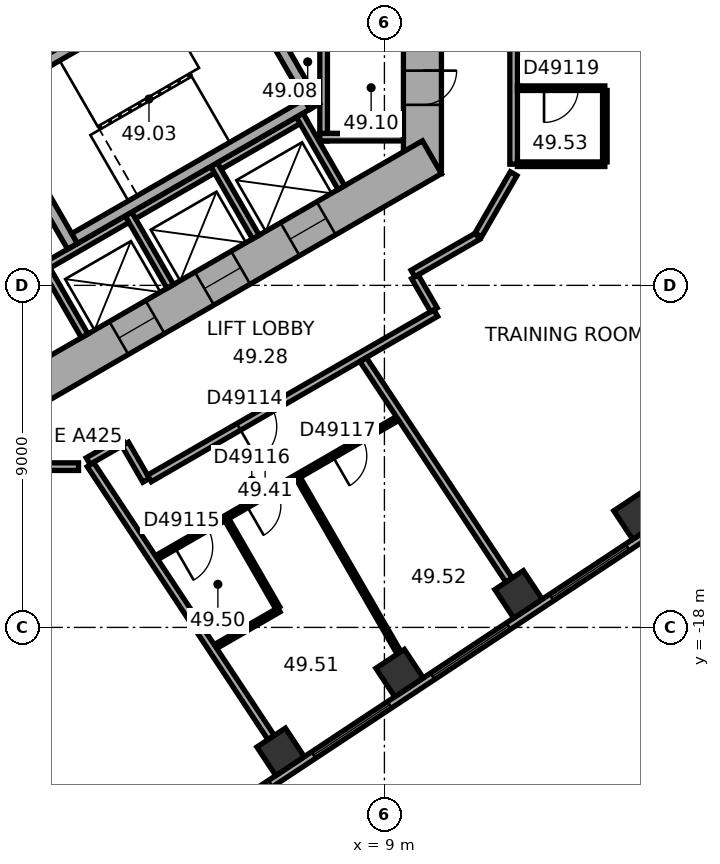
"""IFC4 building model, lengths in metres.
Left out: names, types, materials, properties, quantities, classifications, styles, units other than length and angle.
Written with IfcOpenShell. Run it as: python <this file> out.ifc"""

import sys

from ifc_helpers import new_model, si_unit, direction, frame, frame_2d, origin, origin_2d, place, context, subcontext, project, spatial, rectangle, extrude, element, fill, save


model = new_model("IFC4")
c1 = context("Model", 3, precision=1e-05, world=origin(), true_north=direction((0.0, 1.0)))
c2 = subcontext(c1, "Body", "Model", "MODEL_VIEW")
j1 = project(units=[si_unit("LENGTHUNIT", "METRE"), si_unit("PLANEANGLEUNIT", "RADIAN")], contexts=[c1])
p1 = place(None, origin())
s1 = spatial("IfcSite", under=j1, at=p1, CompositionType="ELEMENT")
p2 = place(p1, origin())
s2 = spatial("IfcBuilding", under=s1, at=p2, CompositionType="ELEMENT")
p3 = place(p2, frame((0.0, 0.0, 198.4)))
s3 = spatial("IfcBuildingStorey", under=s2, at=p3, CompositionType="ELEMENT", Elevation=198.4)
for number, where, z_axis, x_axis in (
    (1, (6.268, -21.274, 0.0), (0.0, 0.0, 1.0), (0.834, 0.552, 0.0)),
    (2, (9.398, -19.202, 0.0), (0.0, 0.0, 1.0), (0.834, 0.552, 0.0)),
    (3, (12.529, -17.13, 0.0), (0.0, 0.0, 1.0), (0.834, 0.552, 0.0)),
    (4, (15.659, -15.058, 0.0), (0.0, 0.0, 1.0), (0.834, 0.552, 0.0)),
):
    element("IfcColumn", number, at=place(p3, frame(where, z_axis=z_axis, x_axis=x_axis)), inside=s3, PredefinedType="COLUMN", context=c2, shape_type="SweptSolid", body=[
        extrude(rectangle(XDim=0.9, YDim=0.9, at=origin_2d()), origin(), (0.0, 0.0, 1.0), 3.7),
    ])
p4 = place(p3, frame((10.0, -6.062, 0.0), z_axis=(0.0, 0.0, 1.0), x_axis=(0.0, 1.0, 0.0)))
e5 = element("IfcWall", 5, at=p4, inside=s3, PredefinedType="SHEAR", context=c2, shape_type="SweptSolid", body=[
    extrude(rectangle(XDim=12.125, YDim=1.0, at=frame_2d((6.062, 0.0))), origin(), (0.0, 0.0, 1.0), 3.7),
])
p5 = place(p4, frame((6.262, 0.0, 0.0)))
e6 = element("IfcOpeningElement", 6, at=p5, cuts=e5, PredefinedType="OPENING", context=c2, shape_type="SweptSolid", body=[
    extrude(rectangle(XDim=1.5, YDim=2.1, at=frame_2d((0.75, 1.05))), frame((0.0, 0.51, 0.0), z_axis=(0.0, -1.0, 0.0), x_axis=(1.0, 0.0, 0.0)), (0.0, 0.0, 1.0), 1.02),
])
p6 = place(p4, frame((1.812, 0.0, 0.0)))
e7 = element("IfcOpeningElement", 7, at=p6, cuts=e5, PredefinedType="OPENING", context=c2, shape_type="SweptSolid", body=[
    extrude(rectangle(XDim=0.9, YDim=2.1, at=frame_2d((0.45, 1.05))), frame((0.0, 0.51, 0.0), z_axis=(0.0, -1.0, 0.0), x_axis=(1.0, 0.0, 0.0)), (0.0, 0.0, 1.0), 1.02),
])
p7 = place(p4, frame((4.412, 0.0, 0.0)))
e8 = element("IfcOpeningElement", 8, at=p7, cuts=e5, PredefinedType="OPENING", context=c2, shape_type="SweptSolid", body=[
    extrude(rectangle(XDim=0.9, YDim=2.1, at=frame_2d((0.45, 1.05))), frame((0.0, 0.51, 0.0), z_axis=(0.0, -1.0, 0.0), x_axis=(1.0, 0.0, 0.0)), (0.0, 0.0, 1.0), 1.02),
])
p8 = place(p3, frame((-10.25, -5.629, 0.0), z_axis=(0.0, 0.0, 1.0), x_axis=(0.866022616891, -0.50000482701, 0.0)))
e9 = element("IfcWall", 9, at=p8, inside=s3, PredefinedType="SHEAR", context=c2, shape_type="SweptSolid", body=[
    extrude(rectangle(XDim=12.125, YDim=1.0, at=frame_2d((6.062, 0.0))), origin(), (0.0, 0.0, 1.0), 3.7),
])
p9 = place(p8, frame((6.262, 0.0, 0.0)))
e10 = element("IfcOpeningElement", 10, at=p9, cuts=e9, PredefinedType="OPENING", context=c2, shape_type="SweptSolid", body=[
    extrude(rectangle(XDim=1.5, YDim=2.1, at=frame_2d((0.75, 1.05))), frame((0.0, 0.51, 0.0), z_axis=(0.0, -1.0, 0.0), x_axis=(1.0, 0.0, 0.0)), (0.0, 0.0, 1.0), 1.02),
])
p10 = place(p8, frame((1.712, 0.0, 0.0)))
e11 = element("IfcOpeningElement", 11, at=p10, cuts=e9, PredefinedType="OPENING", context=c2, shape_type="SweptSolid", body=[
    extrude(rectangle(XDim=1.1, YDim=2.1, at=frame_2d((0.55, 1.05))), frame((0.0, 0.51, 0.0), z_axis=(0.0, -1.0, 0.0), x_axis=(1.0, 0.0, 0.0)), (0.0, 0.0, 1.0), 1.02),
])
p11 = place(p8, frame((4.312, 0.0, 0.0)))
e12 = element("IfcOpeningElement", 12, at=p11, cuts=e9, PredefinedType="OPENING", context=c2, shape_type="SweptSolid", body=[
    extrude(rectangle(XDim=1.1, YDim=2.1, at=frame_2d((0.55, 1.05))), frame((0.0, 0.51, 0.0), z_axis=(0.0, -1.0, 0.0), x_axis=(1.0, 0.0, 0.0)), (0.0, 0.0, 1.0), 1.02),
])
p12 = place(p3, frame((-0.25, -11.691, 0.0), z_axis=(0.0, 0.0, 1.0), x_axis=(0.866022616891, 0.50000482701, 0.0)))
e13 = element("IfcWall", 13, at=p12, inside=s3, PredefinedType="SHEAR", context=c2, shape_type="SweptSolid", body=[
    extrude(rectangle(XDim=12.125, YDim=1.0, at=frame_2d((6.062, 0.0))), origin(), (0.0, 0.0, 1.0), 3.7),
])
p13 = place(p12, frame((2.612, 0.0, 0.0)))
e14 = element("IfcOpeningElement", 14, at=p13, cuts=e13, PredefinedType="OPENING", context=c2, shape_type="SweptSolid", body=[
    extrude(rectangle(XDim=1.1, YDim=2.1, at=frame_2d((0.55, 1.05))), frame((0.0, 0.51, 0.0), z_axis=(0.0, -1.0, 0.0), x_axis=(1.0, 0.0, 0.0)), (0.0, 0.0, 1.0), 1.02),
])
p14 = place(p12, frame((5.212, 0.0, 0.0)))
e15 = element("IfcOpeningElement", 15, at=p14, cuts=e13, PredefinedType="OPENING", context=c2, shape_type="SweptSolid", body=[
    extrude(rectangle(XDim=1.1, YDim=2.1, at=frame_2d((0.55, 1.05))), frame((0.0, 0.51, 0.0), z_axis=(0.0, -1.0, 0.0), x_axis=(1.0, 0.0, 0.0)), (0.0, 0.0, 1.0), 1.02),
])
p15 = place(p12, frame((7.812, 0.0, 0.0)))
e16 = element("IfcOpeningElement", 16, at=p15, cuts=e13, PredefinedType="OPENING", context=c2, shape_type="SweptSolid", body=[
    extrude(rectangle(XDim=1.1, YDim=2.1, at=frame_2d((0.55, 1.05))), frame((0.0, 0.51, 0.0), z_axis=(0.0, -1.0, 0.0), x_axis=(1.0, 0.0, 0.0)), (0.0, 0.0, 1.0), 1.02),
])
p16 = place(p3, frame((2.911, -24.156, 0.0), z_axis=(0.0, 0.0, 1.0), x_axis=(0.833882163564, 0.551942512668, 0.0)))
e17 = element("IfcWall", 17, at=p16, inside=s3, PredefinedType="STANDARD", context=c2, shape_type="SweptSolid", body=[
    extrude(rectangle(XDim=20.044, YDim=0.2, at=frame_2d((10.022, 0.0))), origin(), (0.0, 0.0, 1.0), 3.7),
])
p17 = place(p16, frame((1.313, 0.0, 0.9)))
e18 = element("IfcOpeningElement", 18, at=p17, cuts=e17, PredefinedType="OPENING", context=c2, shape_type="SweptSolid", body=[
    extrude(rectangle(XDim=2.4, YDim=2.0, at=frame_2d((1.2, 1.0))), frame((0.0, 0.11, 0.0), z_axis=(0.0, -1.0, 0.0), x_axis=(1.0, 0.0, 0.0)), (0.0, 0.0, 1.0), 0.22),
])
p18 = place(p16, frame((5.067, 0.0, 0.9)))
e19 = element("IfcOpeningElement", 19, at=p18, cuts=e17, PredefinedType="OPENING", context=c2, shape_type="SweptSolid", body=[
    extrude(rectangle(XDim=2.4, YDim=2.0, at=frame_2d((1.2, 1.0))), frame((0.0, 0.11, 0.0), z_axis=(0.0, -1.0, 0.0), x_axis=(1.0, 0.0, 0.0)), (0.0, 0.0, 1.0), 0.22),
])
p19 = place(p16, frame((8.821, 0.0, 0.9)))
e20 = element("IfcOpeningElement", 20, at=p19, cuts=e17, PredefinedType="OPENING", context=c2, shape_type="SweptSolid", body=[
    extrude(rectangle(XDim=2.4, YDim=2.0, at=frame_2d((1.2, 1.0))), frame((0.0, 0.11, 0.0), z_axis=(0.0, -1.0, 0.0), x_axis=(1.0, 0.0, 0.0)), (0.0, 0.0, 1.0), 0.22),
])
p20 = place(p16, frame((12.575, 0.0, 0.9)))
e21 = element("IfcOpeningElement", 21, at=p20, cuts=e17, PredefinedType="OPENING", context=c2, shape_type="SweptSolid", body=[
    extrude(rectangle(XDim=2.4, YDim=2.0, at=frame_2d((1.2, 1.0))), frame((0.0, 0.11, 0.0), z_axis=(0.0, -1.0, 0.0), x_axis=(1.0, 0.0, 0.0)), (0.0, 0.0, 1.0), 0.22),
])
p21 = place(p16, frame((16.329, 0.0, 0.9)))
e22 = element("IfcOpeningElement", 22, at=p21, cuts=e17, PredefinedType="OPENING", context=c2, shape_type="SweptSolid", body=[
    extrude(rectangle(XDim=2.4, YDim=2.0, at=frame_2d((1.2, 1.0))), frame((0.0, 0.11, 0.0), z_axis=(0.0, -1.0, 0.0), x_axis=(1.0, 0.0, 0.0)), (0.0, 0.0, 1.0), 0.22),
])
p22 = place(p3, frame((7.4, -5.2, 0.0), z_axis=(0.0, 0.0, 1.0), x_axis=(0.0, 1.0, 0.0)))
e23 = element("IfcWall", 23, at=p22, inside=s3, PredefinedType="PARTITIONING", context=c2, shape_type="SweptSolid", body=[
    extrude(rectangle(XDim=5.4, YDim=0.2, at=frame_2d((2.7, 0.0))), origin(), (0.0, 0.0, 1.0), 3.42),
])
p23 = place(p3, frame((7.3, -5.1, 0.0), z_axis=(0.0, 0.0, 1.0), x_axis=(1.0, 0.0, 0.0)))
e24 = element("IfcWall", 24, at=p23, inside=s3, PredefinedType="PARTITIONING", context=c2, shape_type="SweptSolid", body=[
    extrude(rectangle(XDim=2.2, YDim=0.2, at=frame_2d((1.1, 0.0))), origin(), (0.0, 0.0, 1.0), 3.42),
])
p24 = place(p3, frame((-0.024, -8.559, 0.0), z_axis=(0.0, 0.0, 1.0), x_axis=(0.866026010844, 0.49999894854, 0.0)))
e25 = element("IfcWall", 25, at=p24, inside=s3, PredefinedType="PARTITIONING", context=c2, shape_type="SweptSolid", body=[
    extrude(rectangle(XDim=8.0, YDim=0.2, at=frame_2d((4.0, 0.0))), origin(), (0.0, 0.0, 1.0), 3.42),
])
for number, where, z_axis, x_axis in (
    (26, (0.013, -8.422, 0.0), (0.0, 0.0, 1.0), (0.5, -0.866, 0.0)),
    (27, (2.264, -7.122, 0.0), (0.0, 0.0, 1.0), (0.5, -0.866, 0.0)),
    (28, (4.516, -5.822, 0.0), (0.0, 0.0, 1.0), (0.5, -0.866, 0.0)),
    (29, (6.768, -4.522, 0.0), (0.0, 0.0, 1.0), (0.5, -0.866, 0.0)),
):
    element("IfcWall", number, at=place(p3, frame(where, z_axis=z_axis, x_axis=x_axis)), inside=s3, PredefinedType="PARTITIONING", context=c2, shape_type="SweptSolid", body=[
        extrude(rectangle(XDim=2.2, YDim=0.2, at=frame_2d((1.1, 0.0))), origin(), (0.0, 0.0, 1.0), 3.42),
    ])
p25 = place(p3, frame((-1.558, -3.902, 0.0), z_axis=(0.0, 0.0, 1.0), x_axis=(0.499977259774, -0.866038532462, 0.0)))
e30 = element("IfcWall", 30, at=p25, inside=s3, PredefinedType="SHEAR", context=c2, shape_type="SweptSolid", body=[
    extrude(rectangle(XDim=4.7, YDim=0.3, at=frame_2d((2.35, 0.0))), origin(), (0.0, 0.0, 1.0), 3.42),
])
p26 = place(p25, frame((0.8, 0.0, 0.0)))
e31 = element("IfcOpeningElement", 31, at=p26, cuts=e30, PredefinedType="OPENING", context=c2, shape_type="SweptSolid", body=[
    extrude(rectangle(XDim=1.2, YDim=2.1, at=frame_2d((0.6, 1.05))), frame((0.0, 0.16, 0.0), z_axis=(0.0, -1.0, 0.0), x_axis=(1.0, 0.0, 0.0)), (0.0, 0.0, 1.0), 0.32),
])
p27 = place(p3, frame((4.816, -0.222, 0.0), z_axis=(0.0, 0.0, 1.0), x_axis=(0.499977259774, -0.866038532462, 0.0)))
e32 = element("IfcWall", 32, at=p27, inside=s3, PredefinedType="SHEAR", context=c2, shape_type="SweptSolid", body=[
    extrude(rectangle(XDim=4.7, YDim=0.3, at=frame_2d((2.35, 0.0))), origin(), (0.0, 0.0, 1.0), 3.42),
])
for number, where, z_axis, x_axis in (
    (33, (-1.353, -3.957, 0.0), (0.0, 0.0, 1.0), (0.866, 0.5, 0.0)),
    (34, (0.847, -7.767, 0.0), (0.0, 0.0, 1.0), (0.866, 0.5, 0.0)),
):
    element("IfcWall", number, at=place(p3, frame(where, z_axis=z_axis, x_axis=x_axis)), inside=s3, PredefinedType="SHEAR", context=c2, shape_type="SweptSolid", body=[
        extrude(rectangle(XDim=7.06, YDim=0.3, at=frame_2d((3.53, 0.0))), origin(), (0.0, 0.0, 1.0), 3.42),
    ])
p28 = place(p3, frame((-0.91, -13.77, 0.0), z_axis=(0.0, 0.0, 1.0), x_axis=(1.0, 0.0, 0.0)))
e35 = element("IfcWall", 35, at=p28, inside=s3, PredefinedType="PARTITIONING", context=c2, shape_type="SweptSolid", body=[
    extrude(rectangle(XDim=1.86, YDim=0.2, at=frame_2d((0.93, 0.0))), origin(), (0.0, 0.0, 1.0), 3.42),
])
p29 = place(p3, frame((1.204, -13.623, 0.0), z_axis=(0.0, 0.0, 1.0), x_axis=(0.866040989419, 0.499973003918, 0.0)))
e36 = element("IfcWall", 36, at=p29, inside=s3, PredefinedType="PARTITIONING", context=c2, shape_type="SweptSolid", body=[
    extrude(rectangle(XDim=1.068, YDim=0.2, at=frame_2d((0.534, 0.0))), origin(), (0.0, 0.0, 1.0), 3.42),
])
p30 = place(p3, frame((2.179, -13.176, 0.0), z_axis=(0.0, 0.0, 1.0), x_axis=(0.499978356969, -0.866037899034, 0.0)))
e37 = element("IfcWall", 37, at=p30, inside=s3, PredefinedType="PARTITIONING", context=c2, shape_type="SweptSolid", body=[
    extrude(rectangle(XDim=1.101, YDim=0.2, at=frame_2d((0.551, 0.0))), origin(), (0.0, 0.0, 1.0), 3.42),
])
p31 = place(p3, frame((2.816, -14.079, 0.0), z_axis=(0.0, 0.0, 1.0), x_axis=(0.866021128829, 0.500007404367, 0.0)))
e38 = element("IfcWall", 38, at=p31, inside=s3, PredefinedType="PARTITIONING", context=c2, shape_type="SweptSolid", body=[
    extrude(rectangle(XDim=8.702, YDim=0.2, at=frame_2d((4.351, 0.0))), origin(), (0.0, 0.0, 1.0), 3.42),
])
p32 = place(p31, frame((2.714, 0.0, 0.0)))
e39 = element("IfcOpeningElement", 39, at=p32, cuts=e38, PredefinedType="OPENING", context=c2, shape_type="SweptSolid", body=[
    extrude(rectangle(XDim=1.0, YDim=2.1, at=frame_2d((0.5, 1.05))), frame((0.0, 0.11, 0.0), z_axis=(0.0, -1.0, 0.0), x_axis=(1.0, 0.0, 0.0)), (0.0, 0.0, 1.0), 0.22),
])
p33 = place(p3, frame((3.005, -16.164, 0.0), z_axis=(0.0, 0.0, 1.0), x_axis=(0.866018452427, 0.500012039911, 0.0)))
e40 = element("IfcWall", 40, at=p33, inside=s3, PredefinedType="PARTITIONING", context=c2, shape_type="SweptSolid", body=[
    extrude(rectangle(XDim=7.322, YDim=0.12, at=frame_2d((3.661, 0.0))), origin(), (0.0, 0.0, 1.0), 3.42),
])
p34 = place(p33, frame((0.55, 0.0, 0.0)))
e41 = element("IfcOpeningElement", 41, at=p34, cuts=e40, PredefinedType="OPENING", context=c2, shape_type="SweptSolid", body=[
    extrude(rectangle(XDim=1.0, YDim=2.1, at=frame_2d((0.5, 1.05))), frame((0.0, 0.07, 0.0), z_axis=(0.0, -1.0, 0.0), x_axis=(1.0, 0.0, 0.0)), (0.0, 0.0, 1.0), 0.14),
])
p35 = place(p33, frame((2.736, 0.0, 0.0)))
e42 = element("IfcOpeningElement", 42, at=p35, cuts=e40, PredefinedType="OPENING", context=c2, shape_type="SweptSolid", body=[
    extrude(rectangle(XDim=0.9, YDim=2.1, at=frame_2d((0.45, 1.05))), frame((0.0, 0.07, 0.0), z_axis=(0.0, -1.0, 0.0), x_axis=(1.0, 0.0, 0.0)), (0.0, 0.0, 1.0), 0.14),
])
p36 = place(p33, frame((5.347, 0.0, 0.0)))
e43 = element("IfcOpeningElement", 43, at=p36, cuts=e40, PredefinedType="OPENING", context=c2, shape_type="SweptSolid", body=[
    extrude(rectangle(XDim=0.9, YDim=2.1, at=frame_2d((0.45, 1.05))), frame((0.0, 0.07, 0.0), z_axis=(0.0, -1.0, 0.0), x_axis=(1.0, 0.0, 0.0)), (0.0, 0.0, 1.0), 0.14),
])
p37 = place(p3, frame((4.553, -18.503, 0.0), z_axis=(0.0, 0.0, 1.0), x_axis=(0.865951573249, 0.50012785644, 0.0)))
e44 = element("IfcWall", 44, at=p37, inside=s3, PredefinedType="PARTITIONING", context=c2, shape_type="SweptSolid", body=[
    extrude(rectangle(XDim=1.929, YDim=0.12, at=frame_2d((0.964, 0.0))), origin(), (0.0, 0.0, 1.0), 3.42),
])
p38 = place(p3, frame((6.02, -20.899, 0.0), z_axis=(0.0, 0.0, 1.0), x_axis=(-0.551943990108, 0.833881185651, 0.0)))
e45 = element("IfcWall", 45, at=p38, inside=s3, PredefinedType="PARTITIONING", context=c2, shape_type="SweptSolid", body=[
    extrude(rectangle(XDim=8.615, YDim=0.2, at=frame_2d((4.308, 0.0))), origin(), (0.0, 0.0, 1.0), 3.42),
])
p39 = place(p3, frame((6.194, -17.487, 0.0), z_axis=(0.0, 0.0, 1.0), x_axis=(-0.499980071345, 0.866036909293, 0.0)))
e46 = element("IfcWall", 46, at=p39, inside=s3, PredefinedType="PARTITIONING", context=c2, shape_type="SweptSolid", body=[
    extrude(rectangle(XDim=2.68, YDim=0.12, at=frame_2d((1.34, 0.0))), origin(), (0.0, 0.0, 1.0), 3.42),
])
p40 = place(p3, frame((9.385, -18.672, 0.0), z_axis=(0.0, 0.0, 1.0), x_axis=(-0.500012117035, 0.866018407898, 0.0)))
e47 = element("IfcWall", 47, at=p40, inside=s3, PredefinedType="PARTITIONING", context=c2, shape_type="SweptSolid", body=[
    extrude(rectangle(XDim=5.302, YDim=0.12, at=frame_2d((2.651, 0.0))), origin(), (0.0, 0.0, 1.0), 2.87),
])
p41 = place(p3, frame((9.752, -8.688, 0.0), z_axis=(0.0, 0.0, 1.0), x_axis=(0.865974105138, 0.500088841337, 0.0)))
e48 = element("IfcWall", 48, at=p41, inside=s3, PredefinedType="PARTITIONING", context=c2, shape_type="SweptSolid", body=[
    extrude(rectangle(XDim=1.961, YDim=0.2, at=frame_2d((0.98, 0.0))), origin(), (0.0, 0.0, 1.0), 3.42),
])
p42 = place(p3, frame((10.302, -9.642, 0.0), z_axis=(0.0, 0.0, 1.0), x_axis=(-0.500074377092, 0.865982457891, 0.0)))
e49 = element("IfcWall", 49, at=p42, inside=s3, PredefinedType="PARTITIONING", context=c2, shape_type="SweptSolid", body=[
    extrude(rectangle(XDim=1.001, YDim=0.2, at=frame_2d((0.5, 0.0))), origin(), (0.0, 0.0, 1.0), 3.42),
])
p43 = place(p3, frame((11.47, -7.673, 0.0), z_axis=(0.0, 0.0, 1.0), x_axis=(0.499964847546, 0.866045698112, 0.0)))
e50 = element("IfcWall", 50, at=p43, inside=s3, PredefinedType="PARTITIONING", context=c2, shape_type="SweptSolid", body=[
    extrude(rectangle(XDim=1.86, YDim=0.2, at=frame_2d((0.93, 0.0))), origin(), (0.0, 0.0, 1.0), 3.42),
])
p44 = place(p3, frame((12.281, -16.755, 0.0), z_axis=(0.0, 0.0, 1.0), x_axis=(-0.551925794663, 0.833893228888, 0.0)))
e51 = element("IfcWall", 51, at=p44, inside=s3, PredefinedType="PARTITIONING", context=c2, shape_type="SweptSolid", body=[
    extrude(rectangle(XDim=6.953, YDim=0.2, at=frame_2d((3.476, 0.0))), origin(), (0.0, 0.0, 1.0), 3.42),
])
p45 = place(p3, frame((12.4, -5.812, 0.0), z_axis=(0.0, 0.0, 1.0), x_axis=(0.0, 1.0, 0.0)))
e52 = element("IfcWall", 52, at=p45, inside=s3, PredefinedType="PARTITIONING", context=c2, shape_type="SweptSolid", body=[
    extrude(rectangle(XDim=4.819, YDim=0.2, at=frame_2d((2.41, 0.0))), origin(), (0.0, 0.0, 1.0), 3.42),
])
p46 = place(p3, frame((12.5, -3.812, 0.0), z_axis=(0.0, 0.0, 1.0), x_axis=(1.0, 0.0, 0.0)))
e53 = element("IfcWall", 53, at=p46, inside=s3, PredefinedType="PARTITIONING", context=c2, shape_type="SweptSolid", body=[
    extrude(rectangle(XDim=2.3, YDim=0.12, at=frame_2d((1.15, 0.0))), origin(), (0.0, 0.0, 1.0), 3.42),
])
p47 = place(p46, frame((0.7, 0.0, 0.0)))
e54 = element("IfcOpeningElement", 54, at=p47, cuts=e53, PredefinedType="OPENING", context=c2, shape_type="SweptSolid", body=[
    extrude(rectangle(XDim=0.9, YDim=2.1, at=frame_2d((0.45, 1.05))), frame((0.0, 0.07, 0.0), z_axis=(0.0, -1.0, 0.0), x_axis=(1.0, 0.0, 0.0)), (0.0, 0.0, 1.0), 0.14),
])
p48 = place(p3, frame((14.8, -5.812, 0.0), z_axis=(0.0, 0.0, 1.0), x_axis=(-1.0, 0.0, 0.0)))
e55 = element("IfcWall", 55, at=p48, inside=s3, PredefinedType="PARTITIONING", context=c2, shape_type="SweptSolid", body=[
    extrude(rectangle(XDim=2.3, YDim=0.12, at=frame_2d((1.15, 0.0))), origin(), (0.0, 0.0, 1.0), 3.42),
])
p49 = place(p3, frame((14.8, -3.872, 0.0), z_axis=(0.0, 0.0, 1.0), x_axis=(0.0, -1.0, 0.0)))
e56 = element("IfcWall", 56, at=p49, inside=s3, PredefinedType="PARTITIONING", context=c2, shape_type="SweptSolid", body=[
    extrude(rectangle(XDim=1.88, YDim=0.12, at=frame_2d((0.94, 0.0))), origin(), (0.0, 0.0, 1.0), 3.42),
])
p50 = place(p17, origin())
e57 = element("IfcWindow", 57, at=p50, inside=s3, PartitioningType="SINGLE_PANEL", PredefinedType="WINDOW", context=c2, shape_type="SweptSolid", body=[
    extrude(rectangle(XDim=2.4, YDim=2.0, at=frame_2d((1.2, 1.0))), frame((0.0, 0.03, 0.0), z_axis=(0.0, -1.0, 0.0), x_axis=(1.0, 0.0, 0.0)), (0.0, 0.0, 1.0), 0.06),
])
fill(e18, e57)
p51 = place(p18, origin())
e58 = element("IfcWindow", 58, at=p51, inside=s3, PartitioningType="SINGLE_PANEL", PredefinedType="WINDOW", context=c2, shape_type="SweptSolid", body=[
    extrude(rectangle(XDim=2.4, YDim=2.0, at=frame_2d((1.2, 1.0))), frame((0.0, 0.03, 0.0), z_axis=(0.0, -1.0, 0.0), x_axis=(1.0, 0.0, 0.0)), (0.0, 0.0, 1.0), 0.06),
])
fill(e19, e58)
p52 = place(p19, origin())
e59 = element("IfcWindow", 59, at=p52, inside=s3, PartitioningType="SINGLE_PANEL", PredefinedType="WINDOW", context=c2, shape_type="SweptSolid", body=[
    extrude(rectangle(XDim=2.4, YDim=2.0, at=frame_2d((1.2, 1.0))), frame((0.0, 0.03, 0.0), z_axis=(0.0, -1.0, 0.0), x_axis=(1.0, 0.0, 0.0)), (0.0, 0.0, 1.0), 0.06),
])
fill(e20, e59)
p53 = place(p20, origin())
e60 = element("IfcWindow", 60, at=p53, inside=s3, PartitioningType="SINGLE_PANEL", PredefinedType="WINDOW", context=c2, shape_type="SweptSolid", body=[
    extrude(rectangle(XDim=2.4, YDim=2.0, at=frame_2d((1.2, 1.0))), frame((0.0, 0.03, 0.0), z_axis=(0.0, -1.0, 0.0), x_axis=(1.0, 0.0, 0.0)), (0.0, 0.0, 1.0), 0.06),
])
fill(e21, e60)
p54 = place(p6, origin())
e61 = element("IfcDoor", 61, at=p54, inside=s3, OperationType="SINGLE_SWING_LEFT", PredefinedType="DOOR", context=c2, shape_type="SweptSolid", body=[
    extrude(rectangle(XDim=0.9, YDim=2.1, at=frame_2d((0.45, 1.05))), frame((0.0, 0.025, 0.0), z_axis=(0.0, -1.0, 0.0), x_axis=(1.0, 0.0, 0.0)), (0.0, 0.0, 1.0), 0.05),
])
fill(e7, e61)
p55 = place(p13, origin())
e62 = element("IfcDoor", 62, at=p55, inside=s3, OperationType="DOUBLE_DOOR_SLIDING", PredefinedType="DOOR", context=c2, shape_type="SweptSolid", body=[
    extrude(rectangle(XDim=1.1, YDim=2.1, at=frame_2d((0.55, 1.05))), frame((0.0, 0.025, 0.0), z_axis=(0.0, -1.0, 0.0), x_axis=(1.0, 0.0, 0.0)), (0.0, 0.0, 1.0), 0.05),
])
fill(e14, e62)
p56 = place(p14, origin())
e63 = element("IfcDoor", 63, at=p56, inside=s3, OperationType="DOUBLE_DOOR_SLIDING", PredefinedType="DOOR", context=c2, shape_type="SweptSolid", body=[
    extrude(rectangle(XDim=1.1, YDim=2.1, at=frame_2d((0.55, 1.05))), frame((0.0, 0.025, 0.0), z_axis=(0.0, -1.0, 0.0), x_axis=(1.0, 0.0, 0.0)), (0.0, 0.0, 1.0), 0.05),
])
fill(e15, e63)
p57 = place(p15, origin())
e64 = element("IfcDoor", 64, at=p57, inside=s3, OperationType="DOUBLE_DOOR_SLIDING", PredefinedType="DOOR", context=c2, shape_type="SweptSolid", body=[
    extrude(rectangle(XDim=1.1, YDim=2.1, at=frame_2d((0.55, 1.05))), frame((0.0, 0.025, 0.0), z_axis=(0.0, -1.0, 0.0), x_axis=(1.0, 0.0, 0.0)), (0.0, 0.0, 1.0), 0.05),
])
fill(e16, e64)
p58 = place(p32, origin())
e65 = element("IfcDoor", 65, at=p58, inside=s3, OperationType="SINGLE_SWING_LEFT", PredefinedType="DOOR", context=c2, shape_type="SweptSolid", body=[
    extrude(rectangle(XDim=1.0, YDim=2.1, at=frame_2d((0.5, 1.05))), frame((0.0, 0.025, 0.0), z_axis=(0.0, -1.0, 0.0), x_axis=(1.0, 0.0, 0.0)), (0.0, 0.0, 1.0), 0.05),
])
fill(e39, e65)
p59 = place(p34, origin())
e66 = element("IfcDoor", 66, at=p59, inside=s3, OperationType="SINGLE_SWING_LEFT", PredefinedType="DOOR", context=c2, shape_type="SweptSolid", body=[
    extrude(rectangle(XDim=1.0, YDim=2.1, at=frame_2d((0.5, 1.05))), frame((0.0, 0.025, 0.0), z_axis=(0.0, -1.0, 0.0), x_axis=(1.0, 0.0, 0.0)), (0.0, 0.0, 1.0), 0.05),
])
fill(e41, e66)
p60 = place(p35, origin())
e67 = element("IfcDoor", 67, at=p60, inside=s3, OperationType="SINGLE_SWING_LEFT", PredefinedType="DOOR", context=c2, shape_type="SweptSolid", body=[
    extrude(rectangle(XDim=0.9, YDim=2.1, at=frame_2d((0.45, 1.05))), frame((0.0, 0.025, 0.0), z_axis=(0.0, -1.0, 0.0), x_axis=(1.0, 0.0, 0.0)), (0.0, 0.0, 1.0), 0.05),
])
fill(e42, e67)
p61 = place(p36, origin())
e68 = element("IfcDoor", 68, at=p61, inside=s3, OperationType="SINGLE_SWING_LEFT", PredefinedType="DOOR", context=c2, shape_type="SweptSolid", body=[
    extrude(rectangle(XDim=0.9, YDim=2.1, at=frame_2d((0.45, 1.05))), frame((0.0, 0.025, 0.0), z_axis=(0.0, -1.0, 0.0), x_axis=(1.0, 0.0, 0.0)), (0.0, 0.0, 1.0), 0.05),
])
fill(e43, e68)
p62 = place(p47, origin())
e69 = element("IfcDoor", 69, at=p62, inside=s3, OperationType="SINGLE_SWING_LEFT", PredefinedType="DOOR", context=c2, shape_type="SweptSolid", body=[
    extrude(rectangle(XDim=0.9, YDim=2.1, at=frame_2d((0.45, 1.05))), frame((0.0, 0.025, 0.0), z_axis=(0.0, -1.0, 0.0), x_axis=(1.0, 0.0, 0.0)), (0.0, 0.0, 1.0), 0.05),
])
fill(e54, e69)
save(model, sys.argv[1])
